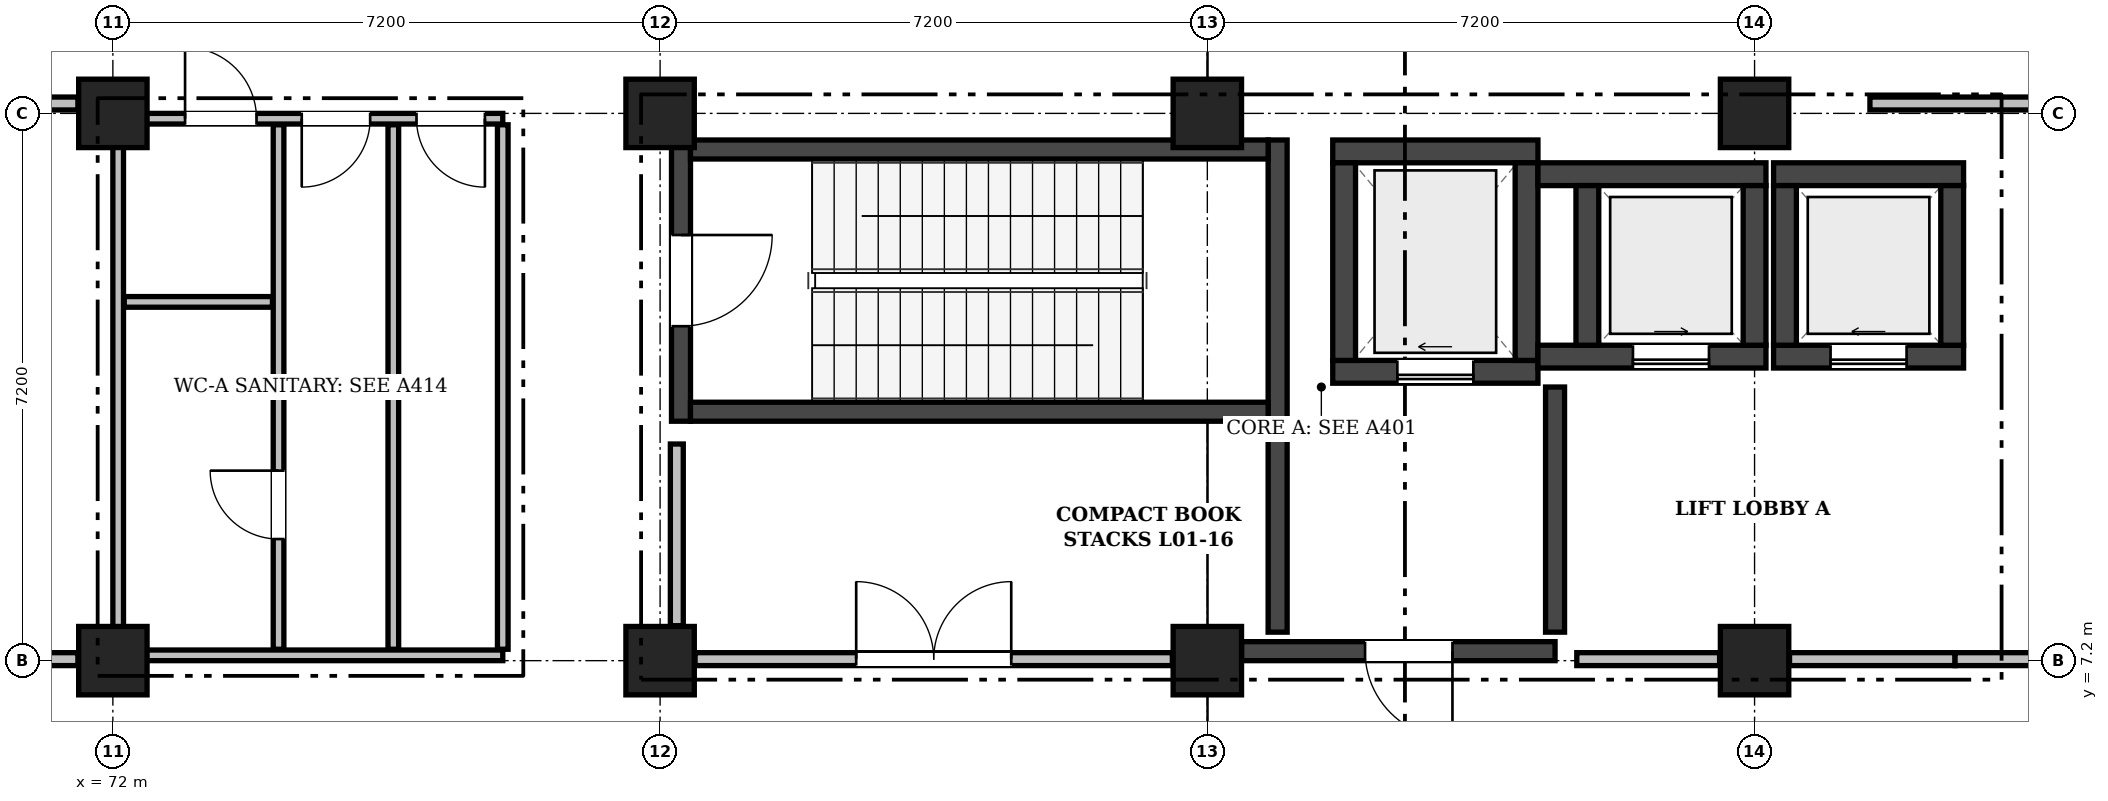
"""IFC4 building model, lengths in metres.
Left out: names, types, materials, properties, quantities, classifications, styles, units other than length and angle.
Written with IfcOpenShell. Run it as: python <this file> out.ifc"""

import sys

from ifc_helpers import new_model, si_unit, direction, frame, frame_2d, origin, origin_2d, place, context, subcontext, project, spatial, rectangle, extrude, element, fill, save


model = new_model("IFC4")
c1 = context("Model", 3, precision=1e-05, world=origin(), true_north=direction((0.0, 1.0)))
c2 = subcontext(c1, "Body", "Model", "MODEL_VIEW")
j1 = project(units=[si_unit("LENGTHUNIT", "METRE"), si_unit("PLANEANGLEUNIT", "RADIAN")], contexts=[c1])
p1 = place(None, origin())
s1 = spatial("IfcSite", under=j1, at=p1, CompositionType="ELEMENT")
p2 = place(p1, origin())
s2 = spatial("IfcBuilding", under=s1, at=p2, CompositionType="ELEMENT")
p3 = place(p2, frame((0.0, 0.0, 4.8)))
s3 = spatial("IfcBuildingStorey", under=s2, at=p3, CompositionType="ELEMENT", Elevation=4.8)
for number, where, z_axis, x_axis in (
    (1, (72.0, 7.2, 0.0), (0.0, 0.0, 1.0), (1.0, 0.0, 0.0)),
    (2, (72.0, 14.4, 0.0), (0.0, 0.0, 1.0), (1.0, 0.0, 0.0)),
    (3, (79.2, 7.2, 0.0), (0.0, 0.0, 1.0), (1.0, 0.0, 0.0)),
    (4, (79.2, 14.4, 0.0), (0.0, 0.0, 1.0), (1.0, 0.0, 0.0)),
    (5, (86.4, 7.2, 0.0), (0.0, 0.0, 1.0), (1.0, 0.0, 0.0)),
    (6, (86.4, 14.4, 0.0), (0.0, 0.0, 1.0), (1.0, 0.0, 0.0)),
    (7, (93.6, 7.2, 0.0), (0.0, 0.0, 1.0), (1.0, 0.0, 0.0)),
    (8, (93.6, 14.4, 0.0), (0.0, 0.0, 1.0), (1.0, 0.0, 0.0)),
):
    element("IfcColumn", number, at=place(p3, frame(where, z_axis=z_axis, x_axis=x_axis)), inside=s3, PredefinedType="COLUMN", context=c2, shape_type="SweptSolid", body=[
        extrude(rectangle(XDim=0.9, YDim=0.9, at=origin_2d()), origin(), (0.0, 0.0, 1.0), 4.8),
    ])
p4 = place(p3, frame((88.05, 11.0, 0.0), z_axis=(0.0, 0.0, 1.0), x_axis=(1.0, 0.0, 0.0)))
e9 = element("IfcWall", 9, at=p4, inside=s3, PredefinedType="SHEAR", context=c2, shape_type="SweptSolid", body=[
    extrude(rectangle(XDim=2.7, YDim=0.3, at=frame_2d((1.35, 0.0))), origin(), (0.0, 0.0, 1.0), 4.55),
])
p5 = place(p4, frame((0.85, 0.0, 0.0)))
e10 = element("IfcOpeningElement", 10, at=p5, cuts=e9, PredefinedType="OPENING", context=c2, shape_type="SweptSolid", body=[
    extrude(rectangle(XDim=1.0, YDim=2.1, at=frame_2d((0.5, 1.05))), frame((0.0, 0.162, 0.0), z_axis=(0.0, -1.0, 0.0), x_axis=(1.0, 0.0, 0.0)), (0.0, 0.0, 1.0), 0.324),
])
p6 = place(p3, frame((88.05, 13.9, 0.0), z_axis=(0.0, 0.0, 1.0), x_axis=(1.0, 0.0, 0.0)))
e11 = element("IfcWall", 11, at=p6, inside=s3, PredefinedType="SHEAR", context=c2, shape_type="SweptSolid", body=[
    extrude(rectangle(XDim=2.7, YDim=0.3, at=frame_2d((1.35, 0.0))), origin(), (0.0, 0.0, 1.0), 4.55),
])
for number, where, z_axis, x_axis in (
    (12, (88.2, 11.15, 0.0), (0.0, 0.0, 1.0), (0.0, 1.0, 0.0)),
    (13, (90.6, 11.15, 0.0), (0.0, 0.0, 1.0), (0.0, 1.0, 0.0)),
):
    element("IfcWall", number, at=place(p3, frame(where, z_axis=z_axis, x_axis=x_axis)), inside=s3, PredefinedType="SHEAR", context=c2, shape_type="SweptSolid", body=[
        extrude(rectangle(XDim=2.6, YDim=0.3, at=frame_2d((1.3, 0.0))), origin(), (0.0, 0.0, 1.0), 4.55),
    ])
p7 = place(p3, frame((90.75, 11.2, 0.0), z_axis=(0.0, 0.0, 1.0), x_axis=(1.0, 0.0, 0.0)))
e14 = element("IfcWall", 14, at=p7, inside=s3, PredefinedType="SHEAR", context=c2, shape_type="SweptSolid", body=[
    extrude(rectangle(XDim=3.0, YDim=0.3, at=frame_2d((1.5, 0.0))), origin(), (0.0, 0.0, 1.0), 4.55),
])
p8 = place(p7, frame((1.25, 0.0, 0.0)))
e15 = element("IfcOpeningElement", 15, at=p8, cuts=e14, PredefinedType="OPENING", context=c2, shape_type="SweptSolid", body=[
    extrude(rectangle(XDim=1.0, YDim=2.1, at=frame_2d((0.5, 1.05))), frame((0.0, 0.162, 0.0), z_axis=(0.0, -1.0, 0.0), x_axis=(1.0, 0.0, 0.0)), (0.0, 0.0, 1.0), 0.324),
])
p9 = place(p3, frame((90.75, 13.6, 0.0), z_axis=(0.0, 0.0, 1.0), x_axis=(1.0, 0.0, 0.0)))
e16 = element("IfcWall", 16, at=p9, inside=s3, PredefinedType="SHEAR", context=c2, shape_type="SweptSolid", body=[
    extrude(rectangle(XDim=3.0, YDim=0.3, at=frame_2d((1.5, 0.0))), origin(), (0.0, 0.0, 1.0), 4.55),
])
for number, where, z_axis, x_axis in (
    (17, (91.4, 11.35, 0.0), (0.0, 0.0, 1.0), (0.0, 1.0, 0.0)),
    (18, (93.6, 11.35, 0.0), (0.0, 0.0, 1.0), (0.0, 1.0, 0.0)),
):
    element("IfcWall", number, at=place(p3, frame(where, z_axis=z_axis, x_axis=x_axis)), inside=s3, PredefinedType="SHEAR", context=c2, shape_type="SweptSolid", body=[
        extrude(rectangle(XDim=2.1, YDim=0.3, at=frame_2d((1.05, 0.0))), origin(), (0.0, 0.0, 1.0), 4.55),
    ])
p10 = place(p3, frame((93.85, 11.2, 0.0), z_axis=(0.0, 0.0, 1.0), x_axis=(1.0, 0.0, 0.0)))
e19 = element("IfcWall", 19, at=p10, inside=s3, PredefinedType="SHEAR", context=c2, shape_type="SweptSolid", body=[
    extrude(rectangle(XDim=2.5, YDim=0.3, at=frame_2d((1.25, 0.0))), origin(), (0.0, 0.0, 1.0), 4.55),
])
p11 = place(p10, frame((0.75, 0.0, 0.0)))
e20 = element("IfcOpeningElement", 20, at=p11, cuts=e19, PredefinedType="OPENING", context=c2, shape_type="SweptSolid", body=[
    extrude(rectangle(XDim=1.0, YDim=2.1, at=frame_2d((0.5, 1.05))), frame((0.0, 0.162, 0.0), z_axis=(0.0, -1.0, 0.0), x_axis=(1.0, 0.0, 0.0)), (0.0, 0.0, 1.0), 0.324),
])
p12 = place(p3, frame((93.85, 13.6, 0.0), z_axis=(0.0, 0.0, 1.0), x_axis=(1.0, 0.0, 0.0)))
e21 = element("IfcWall", 21, at=p12, inside=s3, PredefinedType="SHEAR", context=c2, shape_type="SweptSolid", body=[
    extrude(rectangle(XDim=2.5, YDim=0.3, at=frame_2d((1.25, 0.0))), origin(), (0.0, 0.0, 1.0), 4.55),
])
for number, where, z_axis, x_axis in (
    (22, (94.0, 11.35, 0.0), (0.0, 0.0, 1.0), (0.0, 1.0, 0.0)),
    (23, (96.2, 11.35, 0.0), (0.0, 0.0, 1.0), (0.0, 1.0, 0.0)),
):
    element("IfcWall", number, at=place(p3, frame(where, z_axis=z_axis, x_axis=x_axis)), inside=s3, PredefinedType="SHEAR", context=c2, shape_type="SweptSolid", body=[
        extrude(rectangle(XDim=2.1, YDim=0.3, at=frame_2d((1.05, 0.0))), origin(), (0.0, 0.0, 1.0), 4.55),
    ])
p13 = place(p3, frame((79.475, 10.35, 0.0), z_axis=(0.0, 0.0, 1.0), x_axis=(0.0, 1.0, 0.0)))
e24 = element("IfcWall", 24, at=p13, inside=s3, PredefinedType="SHEAR", context=c2, shape_type="SweptSolid", body=[
    extrude(rectangle(XDim=3.7, YDim=0.25, at=frame_2d((1.85, 0.0))), origin(), (0.0, 0.0, 1.0), 4.55),
])
p14 = place(p13, frame((1.25, 0.0, 0.0)))
e25 = element("IfcOpeningElement", 25, at=p14, cuts=e24, PredefinedType="OPENING", context=c2, shape_type="SweptSolid", body=[
    extrude(rectangle(XDim=1.2, YDim=2.15, at=frame_2d((0.6, 1.075))), frame((0.0, 0.137, 0.0), z_axis=(0.0, -1.0, 0.0), x_axis=(1.0, 0.0, 0.0)), (0.0, 0.0, 1.0), 0.274),
])
p15 = place(p3, frame((87.325, 10.35, 0.0), z_axis=(0.0, 0.0, 1.0), x_axis=(0.0, 1.0, 0.0)))
e26 = element("IfcWall", 26, at=p15, inside=s3, PredefinedType="SHEAR", context=c2, shape_type="SweptSolid", body=[
    extrude(rectangle(XDim=3.7, YDim=0.25, at=frame_2d((1.85, 0.0))), origin(), (0.0, 0.0, 1.0), 4.55),
])
for number, where, z_axis, x_axis in (
    (27, (79.6, 10.475, 0.0), (0.0, 0.0, 1.0), (1.0, 0.0, 0.0)),
    (28, (79.6, 13.925, 0.0), (0.0, 0.0, 1.0), (1.0, 0.0, 0.0)),
):
    element("IfcWall", number, at=place(p3, frame(where, z_axis=z_axis, x_axis=x_axis)), inside=s3, PredefinedType="SHEAR", context=c2, shape_type="SweptSolid", body=[
        extrude(rectangle(XDim=7.6, YDim=0.25, at=frame_2d((3.8, 0.0))), origin(), (0.0, 0.0, 1.0), 4.55),
    ])
p16 = place(p3, frame((86.85, 7.325, 0.0), z_axis=(0.0, 0.0, 1.0), x_axis=(1.0, 0.0, 0.0)))
e29 = element("IfcWall", 29, at=p16, inside=s3, PredefinedType="SHEAR", context=c2, shape_type="SweptSolid", body=[
    extrude(rectangle(XDim=4.125, YDim=0.25, at=frame_2d((2.062, 0.0))), origin(), (0.0, 0.0, 1.0), 4.55),
])
p17 = place(p16, frame((1.625, 0.0, 0.0)))
e30 = element("IfcOpeningElement", 30, at=p17, cuts=e29, PredefinedType="OPENING", context=c2, shape_type="SweptSolid", body=[
    extrude(rectangle(XDim=1.15, YDim=2.15, at=frame_2d((0.575, 1.075))), frame((0.0, 0.137, 0.0), z_axis=(0.0, -1.0, 0.0), x_axis=(1.0, 0.0, 0.0)), (0.0, 0.0, 1.0), 0.274),
])
p18 = place(p3, frame((87.325, 7.575, 0.0), z_axis=(0.0, 0.0, 1.0), x_axis=(0.0, 1.0, 0.0)))
e31 = element("IfcWall", 31, at=p18, inside=s3, PredefinedType="SHEAR", context=c2, shape_type="SweptSolid", body=[
    extrude(rectangle(XDim=2.77, YDim=0.25, at=frame_2d((1.385, 0.0))), origin(), (0.0, 0.0, 1.0), 4.55),
])
p19 = place(p3, frame((90.975, 7.575, 0.0), z_axis=(0.0, 0.0, 1.0), x_axis=(0.0, 1.0, 0.0)))
e32 = element("IfcWall", 32, at=p19, inside=s3, PredefinedType="SHEAR", context=c2, shape_type="SweptSolid", body=[
    extrude(rectangle(XDim=3.225, YDim=0.25, at=frame_2d((1.613, 0.0))), origin(), (0.0, 0.0, 1.0), 4.55),
])
p20 = place(p3, frame((72.07, 7.27, 0.0), z_axis=(0.0, 0.0, 1.0), x_axis=(1.0, 0.0, 0.0)))
e33 = element("IfcWall", 33, at=p20, inside=s3, PredefinedType="PARTITIONING", context=c2, shape_type="SweptSolid", body=[
    extrude(rectangle(XDim=5.06, YDim=0.14, at=frame_2d((2.53, 0.0))), origin(), (0.0, 0.0, 1.0), 3.9),
])
p21 = place(p3, frame((72.07, 14.33, 0.0), z_axis=(0.0, 0.0, 1.0), x_axis=(1.0, 0.0, 0.0)))
e34 = element("IfcWall", 34, at=p21, inside=s3, PredefinedType="PARTITIONING", context=c2, shape_type="SweptSolid", body=[
    extrude(rectangle(XDim=5.06, YDim=0.14, at=frame_2d((2.53, 0.0))), origin(), (0.0, 0.0, 1.0), 3.9),
])
p22 = place(p21, frame((0.88, 0.0, 0.0)))
e35 = element("IfcOpeningElement", 35, at=p22, cuts=e34, PredefinedType="OPENING", context=c2, shape_type="SweptSolid", body=[
    extrude(rectangle(XDim=0.94, YDim=2.1, at=frame_2d((0.47, 1.05))), frame((0.0, 0.082, 0.0), z_axis=(0.0, -1.0, 0.0), x_axis=(1.0, 0.0, 0.0)), (0.0, 0.0, 1.0), 0.164),
])
p23 = place(p21, frame((2.415, 0.0, 0.0)))
e36 = element("IfcOpeningElement", 36, at=p23, cuts=e34, PredefinedType="OPENING", context=c2, shape_type="SweptSolid", body=[
    extrude(rectangle(XDim=0.9, YDim=2.08, at=frame_2d((0.45, 1.04))), frame((0.0, 0.082, 0.0), z_axis=(0.0, -1.0, 0.0), x_axis=(1.0, 0.0, 0.0)), (0.0, 0.0, 1.0), 0.164),
])
p24 = place(p21, frame((3.925, 0.0, 0.0)))
e37 = element("IfcOpeningElement", 37, at=p24, cuts=e34, PredefinedType="OPENING", context=c2, shape_type="SweptSolid", body=[
    extrude(rectangle(XDim=0.9, YDim=2.08, at=frame_2d((0.45, 1.04))), frame((0.0, 0.082, 0.0), z_axis=(0.0, -1.0, 0.0), x_axis=(1.0, 0.0, 0.0)), (0.0, 0.0, 1.0), 0.164),
])
p25 = place(p3, frame((72.07, 7.35, 0.0), z_axis=(0.0, 0.0, 1.0), x_axis=(0.0, 1.0, 0.0)))
e38 = element("IfcWall", 38, at=p25, inside=s3, PredefinedType="PARTITIONING", context=c2, shape_type="SweptSolid", body=[
    extrude(rectangle(XDim=6.9, YDim=0.14, at=frame_2d((3.45, 0.0))), origin(), (0.0, 0.0, 1.0), 4.08),
])
p26 = place(p3, frame((77.13, 7.35, 0.0), z_axis=(0.0, 0.0, 1.0), x_axis=(0.0, 1.0, 0.0)))
e39 = element("IfcWall", 39, at=p26, inside=s3, PredefinedType="PARTITIONING", context=c2, shape_type="SweptSolid", body=[
    extrude(rectangle(XDim=6.9, YDim=0.14, at=frame_2d((3.45, 0.0))), origin(), (0.0, 0.0, 1.0), 4.46),
])
p27 = place(p3, frame((74.18, 7.35, 0.0), z_axis=(0.0, 0.0, 1.0), x_axis=(0.0, 1.0, 0.0)))
e40 = element("IfcWall", 40, at=p27, inside=s3, PredefinedType="PARTITIONING", context=c2, shape_type="SweptSolid", body=[
    extrude(rectangle(XDim=6.9, YDim=0.14, at=frame_2d((3.45, 0.0))), origin(), (0.0, 0.0, 1.0), 4.46),
])
p28 = place(p27, frame((1.45, 0.0, 0.0)))
e41 = element("IfcOpeningElement", 41, at=p28, cuts=e40, PredefinedType="OPENING", context=c2, shape_type="SweptSolid", body=[
    extrude(rectangle(XDim=0.9, YDim=2.08, at=frame_2d((0.45, 1.04))), frame((0.0, 0.082, 0.0), z_axis=(0.0, -1.0, 0.0), x_axis=(1.0, 0.0, 0.0)), (0.0, 0.0, 1.0), 0.164),
])
p29 = place(p3, frame((75.69, 7.35, 0.0), z_axis=(0.0, 0.0, 1.0), x_axis=(0.0, 1.0, 0.0)))
e42 = element("IfcWall", 42, at=p29, inside=s3, PredefinedType="PARTITIONING", context=c2, shape_type="SweptSolid", body=[
    extrude(rectangle(XDim=6.9, YDim=0.14, at=frame_2d((3.45, 0.0))), origin(), (0.0, 0.0, 1.0), 4.46),
])
p30 = place(p3, frame((72.15, 11.92, 0.0), z_axis=(0.0, 0.0, 1.0), x_axis=(1.0, 0.0, 0.0)))
e43 = element("IfcWall", 43, at=p30, inside=s3, PredefinedType="PARTITIONING", context=c2, shape_type="SweptSolid", body=[
    extrude(rectangle(XDim=1.95, YDim=0.14, at=frame_2d((0.975, 0.0))), origin(), (0.0, 0.0, 1.0), 4.46),
])
p31 = place(p3, frame((61.098, 14.53, 0.0), z_axis=(0.0, 0.0, 1.0), x_axis=(1.0, 0.0, 0.0)))
e44 = element("IfcWall", 44, at=p31, inside=s3, PredefinedType="PARTITIONING", context=c2, shape_type="SweptSolid", body=[
    extrude(rectangle(XDim=10.442, YDim=0.17, at=frame_2d((5.221, 0.0))), origin(), (0.0, 0.0, 1.0), 3.63),
])
p32 = place(p31, frame((4.581, 0.0, 0.0)))
e45 = element("IfcOpeningElement", 45, at=p32, cuts=e44, PredefinedType="OPENING", context=c2, shape_type="SweptSolid", body=[
    extrude(rectangle(XDim=1.28, YDim=2.22, at=frame_2d((0.64, 1.11))), frame((0.0, 0.097, 0.0), z_axis=(0.0, -1.0, 0.0), x_axis=(1.0, 0.0, 0.0)), (0.0, 0.0, 1.0), 0.194),
])
p33 = place(p3, frame((95.118, 14.53, 0.0), z_axis=(0.0, 0.0, 1.0), x_axis=(1.0, 0.0, 0.0)))
e46 = element("IfcWall", 46, at=p33, inside=s3, PredefinedType="PARTITIONING", context=c2, shape_type="SweptSolid", body=[
    extrude(rectangle(XDim=5.222, YDim=0.17, at=frame_2d((2.611, 0.0))), origin(), (0.0, 0.0, 1.0), 3.9),
])
p34 = place(p3, frame((79.42, 7.66, 0.0), z_axis=(0.0, 0.0, 1.0), x_axis=(0.0, 1.0, 0.0)))
e47 = element("IfcWall", 47, at=p34, inside=s3, PredefinedType="PARTITIONING", context=c2, shape_type="SweptSolid", body=[
    extrude(rectangle(XDim=2.39, YDim=0.17, at=frame_2d((1.195, 0.0))), origin(), (0.0, 0.0, 1.0), 4.08),
])
p35 = place(p3, frame((79.66, 7.22, 0.0), z_axis=(0.0, 0.0, 1.0), x_axis=(1.0, 0.0, 0.0)))
e48 = element("IfcWall", 48, at=p35, inside=s3, PredefinedType="PARTITIONING", context=c2, shape_type="SweptSolid", body=[
    extrude(rectangle(XDim=6.28, YDim=0.17, at=frame_2d((3.14, 0.0))), origin(), (0.0, 0.0, 1.0), 3.9),
])
p36 = place(p35, frame((2.12, 0.0, 0.0)))
e49 = element("IfcOpeningElement", 49, at=p36, cuts=e48, PredefinedType="OPENING", context=c2, shape_type="SweptSolid", body=[
    extrude(rectangle(XDim=2.04, YDim=2.34, at=frame_2d((1.02, 1.17))), frame((0.0, 0.097, 0.0), z_axis=(0.0, -1.0, 0.0), x_axis=(1.0, 0.0, 0.0)), (0.0, 0.0, 1.0), 0.194),
])
p37 = place(p3, frame((94.06, 7.22, 0.0), z_axis=(0.0, 0.0, 1.0), x_axis=(1.0, 0.0, 0.0)))
e50 = element("IfcWall", 50, at=p37, inside=s3, PredefinedType="PARTITIONING", context=c2, shape_type="SweptSolid", body=[
    extrude(rectangle(XDim=2.178, YDim=0.17, at=frame_2d((1.089, 0.0))), origin(), (0.0, 0.0, 1.0), 3.9),
])
p38 = place(p3, frame((91.261, 7.22, 0.0), z_axis=(0.0, 0.0, 1.0), x_axis=(1.0, 0.0, 0.0)))
e51 = element("IfcWall", 51, at=p38, inside=s3, PredefinedType="PARTITIONING", context=c2, shape_type="SweptSolid", body=[
    extrude(rectangle(XDim=1.879, YDim=0.17, at=frame_2d((0.939, 0.0))), origin(), (0.0, 0.0, 1.0), 3.9),
])
p39 = place(p3, frame((96.238, 7.22, 0.0), z_axis=(0.0, 0.0, 1.0), x_axis=(1.0, 0.0, 0.0)))
e52 = element("IfcWall", 52, at=p39, inside=s3, PredefinedType="PARTITIONING", context=c2, shape_type="SweptSolid", body=[
    extrude(rectangle(XDim=4.102, YDim=0.17, at=frame_2d((2.051, 0.0))), origin(), (0.0, 0.0, 1.0), 3.9),
])
p40 = place(p3, frame((65.26, 7.22, 0.0), z_axis=(0.0, 0.0, 1.0), x_axis=(1.0, 0.0, 0.0)))
e53 = element("IfcWall", 53, at=p40, inside=s3, PredefinedType="PARTITIONING", context=c2, shape_type="SweptSolid", body=[
    extrude(rectangle(XDim=6.28, YDim=0.17, at=frame_2d((3.14, 0.0))), origin(), (0.0, 0.0, 1.0), 3.9),
])
p41 = place(p5, frame((1.0, 0.0, 0.0), z_axis=(0.0, 0.0, 1.0), x_axis=(-1.0, 0.0, 0.0)))
e54 = element("IfcDoor", 54, at=p41, inside=s3, OperationType="SLIDING_TO_LEFT", PredefinedType="DOOR", context=c2, shape_type="SweptSolid", body=[
    extrude(rectangle(XDim=1.0, YDim=2.1, at=frame_2d((0.5, 1.05))), frame((0.0, 0.025, 0.0), z_axis=(0.0, -1.0, 0.0), x_axis=(1.0, 0.0, 0.0)), (0.0, 0.0, 1.0), 0.05),
])
fill(e10, e54)
p42 = place(p8, frame((1.0, 0.0, 0.0), z_axis=(0.0, 0.0, 1.0), x_axis=(-1.0, 0.0, 0.0)))
e55 = element("IfcDoor", 55, at=p42, inside=s3, OperationType="SLIDING_TO_RIGHT", PredefinedType="DOOR", context=c2, shape_type="SweptSolid", body=[
    extrude(rectangle(XDim=1.0, YDim=2.1, at=frame_2d((0.5, 1.05))), frame((0.0, 0.025, 0.0), z_axis=(0.0, -1.0, 0.0), x_axis=(1.0, 0.0, 0.0)), (0.0, 0.0, 1.0), 0.05),
])
fill(e15, e55)
p43 = place(p11, frame((1.0, 0.0, 0.0), z_axis=(0.0, 0.0, 1.0), x_axis=(-1.0, 0.0, 0.0)))
e56 = element("IfcDoor", 56, at=p43, inside=s3, OperationType="SLIDING_TO_LEFT", PredefinedType="DOOR", context=c2, shape_type="SweptSolid", body=[
    extrude(rectangle(XDim=1.0, YDim=2.1, at=frame_2d((0.5, 1.05))), frame((0.0, 0.025, 0.0), z_axis=(0.0, -1.0, 0.0), x_axis=(1.0, 0.0, 0.0)), (0.0, 0.0, 1.0), 0.05),
])
fill(e20, e56)
p44 = place(p14, frame((1.2, 0.0, 0.0), z_axis=(0.0, 0.0, 1.0), x_axis=(-1.0, 0.0, 0.0)))
e57 = element("IfcDoor", 57, at=p44, inside=s3, OperationType="SINGLE_SWING_LEFT", PredefinedType="DOOR", context=c2, shape_type="SweptSolid", body=[
    extrude(rectangle(XDim=1.2, YDim=2.15, at=frame_2d((0.6, 1.075))), frame((0.0, 0.025, 0.0), z_axis=(0.0, -1.0, 0.0), x_axis=(1.0, 0.0, 0.0)), (0.0, 0.0, 1.0), 0.05),
])
fill(e25, e57)
p45 = place(p17, frame((1.15, 0.0, 0.0), z_axis=(0.0, 0.0, 1.0), x_axis=(-1.0, 0.0, 0.0)))
e58 = element("IfcDoor", 58, at=p45, inside=s3, OperationType="SINGLE_SWING_LEFT", PredefinedType="DOOR", context=c2, shape_type="SweptSolid", body=[
    extrude(rectangle(XDim=1.15, YDim=2.15, at=frame_2d((0.575, 1.075))), frame((0.0, 0.025, 0.0), z_axis=(0.0, -1.0, 0.0), x_axis=(1.0, 0.0, 0.0)), (0.0, 0.0, 1.0), 0.05),
])
fill(e30, e58)
p46 = place(p22, origin())
e59 = element("IfcDoor", 59, at=p46, inside=s3, OperationType="SINGLE_SWING_LEFT", PredefinedType="DOOR", context=c2, shape_type="SweptSolid", body=[
    extrude(rectangle(XDim=0.94, YDim=2.1, at=frame_2d((0.47, 1.05))), frame((0.0, 0.025, 0.0), z_axis=(0.0, -1.0, 0.0), x_axis=(1.0, 0.0, 0.0)), (0.0, 0.0, 1.0), 0.05),
])
fill(e35, e59)
p47 = place(p23, frame((0.9, 0.0, 0.0), z_axis=(0.0, 0.0, 1.0), x_axis=(-1.0, 0.0, 0.0)))
e60 = element("IfcDoor", 60, at=p47, inside=s3, OperationType="SINGLE_SWING_RIGHT", PredefinedType="DOOR", context=c2, shape_type="SweptSolid", body=[
    extrude(rectangle(XDim=0.9, YDim=2.08, at=frame_2d((0.45, 1.04))), frame((0.0, 0.025, 0.0), z_axis=(0.0, -1.0, 0.0), x_axis=(1.0, 0.0, 0.0)), (0.0, 0.0, 1.0), 0.05),
])
fill(e36, e60)
p48 = place(p24, frame((0.9, 0.0, 0.0), z_axis=(0.0, 0.0, 1.0), x_axis=(-1.0, 0.0, 0.0)))
e61 = element("IfcDoor", 61, at=p48, inside=s3, OperationType="SINGLE_SWING_LEFT", PredefinedType="DOOR", context=c2, shape_type="SweptSolid", body=[
    extrude(rectangle(XDim=0.9, YDim=2.08, at=frame_2d((0.45, 1.04))), frame((0.0, 0.025, 0.0), z_axis=(0.0, -1.0, 0.0), x_axis=(1.0, 0.0, 0.0)), (0.0, 0.0, 1.0), 0.05),
])
fill(e37, e61)
p49 = place(p28, origin())
e62 = element("IfcDoor", 62, at=p49, inside=s3, OperationType="SINGLE_SWING_RIGHT", PredefinedType="DOOR", context=c2, shape_type="SweptSolid", body=[
    extrude(rectangle(XDim=0.9, YDim=2.08, at=frame_2d((0.45, 1.04))), frame((0.0, 0.025, 0.0), z_axis=(0.0, -1.0, 0.0), x_axis=(1.0, 0.0, 0.0)), (0.0, 0.0, 1.0), 0.05),
])
fill(e41, e62)
p50 = place(p36, origin())
e63 = element("IfcDoor", 63, at=p50, inside=s3, OperationType="DOUBLE_DOOR_SINGLE_SWING", PredefinedType="DOOR", context=c2, shape_type="SweptSolid", body=[
    extrude(rectangle(XDim=2.04, YDim=2.34, at=frame_2d((1.02, 1.17))), frame((0.0, 0.025, 0.0), z_axis=(0.0, -1.0, 0.0), x_axis=(1.0, 0.0, 0.0)), (0.0, 0.0, 1.0), 0.05),
])
fill(e49, e63)
save(model, sys.argv[1])
